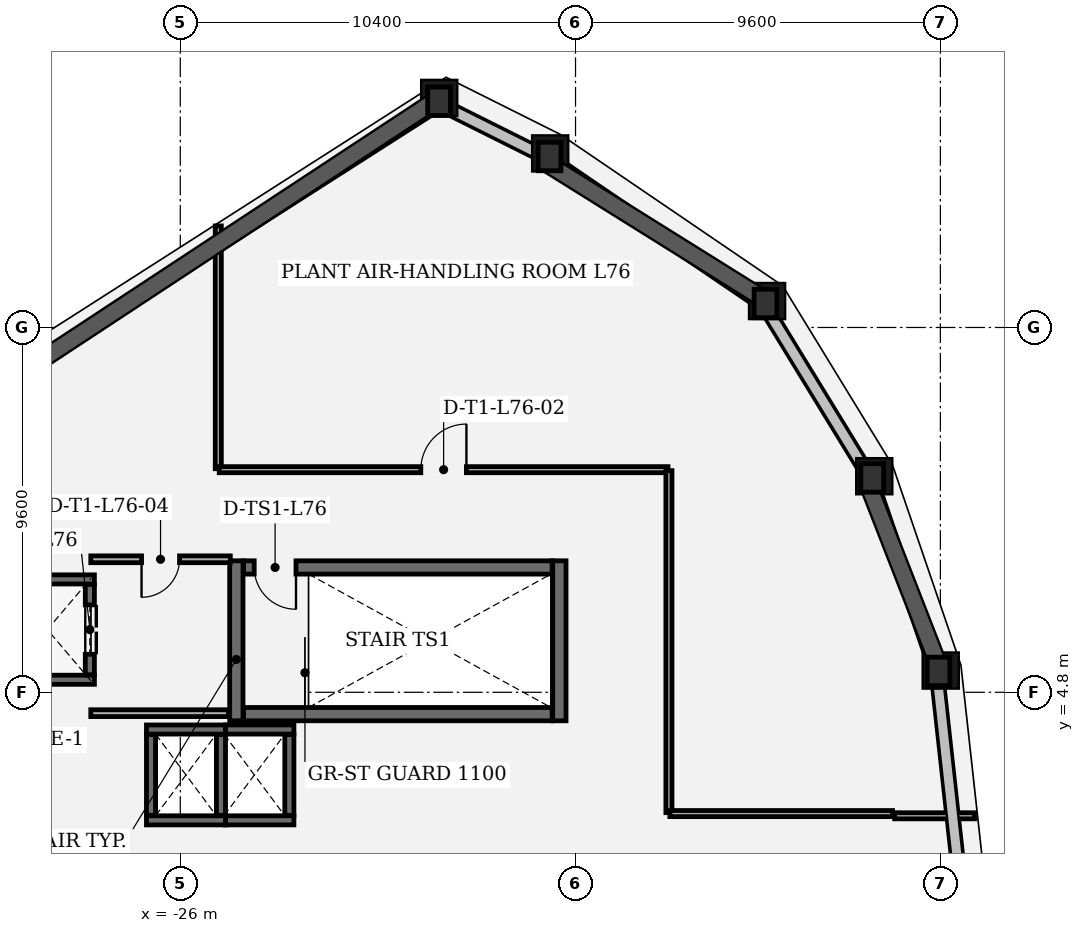
"""IFC4 building model, lengths in metres.
Left out: names, types, materials, properties, quantities, classifications, styles, units other than length and angle.
Written with IfcOpenShell. Run it as: python <this file> out.ifc"""

import sys

from ifc_helpers import new_model, si_unit, direction, frame, frame_2d, origin, place, context, subcontext, project, spatial, rectangle, extrude, element, fill, save


model = new_model("IFC4")
c1 = context("Model", 3, precision=1e-05, world=origin(), true_north=direction((0.0, 1.0)))
c2 = subcontext(c1, "Body", "Model", "MODEL_VIEW")
j1 = project(units=[si_unit("LENGTHUNIT", "METRE"), si_unit("PLANEANGLEUNIT", "RADIAN")], contexts=[c1])
p1 = place(None, origin())
s1 = spatial("IfcSite", under=j1, at=p1, CompositionType="ELEMENT")
p2 = place(p1, origin())
s2 = spatial("IfcBuilding", under=s1, at=p2, CompositionType="ELEMENT")
p3 = place(p2, frame((0.0, 0.0, 327.0)))
s3 = spatial("IfcBuildingStorey", under=s2, at=p3, CompositionType="ELEMENT", Elevation=327.0)
for number, where, z_axis, x_axis in (
    (1, (-24.525, 8.26, 0.0), (0.0, 0.0, 1.0), (0.0, -1.0, 0.0)),
    (2, (-16.025, 4.05, 0.0), (0.0, 0.0, 1.0), (0.0, 1.0, 0.0)),
):
    element("IfcWall", number, at=place(p3, frame(where, z_axis=z_axis, x_axis=x_axis)), inside=s3, PredefinedType="SHEAR", context=c2, shape_type="SweptSolid", body=[
        extrude(rectangle(XDim=4.21, YDim=0.35, at=frame_2d((2.105, 0.0))), origin(), (0.0, 0.0, 1.0), 3.92),
    ])
p4 = place(p3, frame((-24.335, 4.225, 0.0), z_axis=(0.0, 0.0, 1.0), x_axis=(1.0, 0.0, 0.0)))
e3 = element("IfcWall", 3, at=p4, inside=s3, PredefinedType="SHEAR", context=c2, shape_type="SweptSolid", body=[
    extrude(rectangle(XDim=8.12, YDim=0.35, at=frame_2d((4.06, 0.0))), origin(), (0.0, 0.0, 1.0), 3.92),
])
p5 = place(p3, frame((-16.215, 8.085, 0.0), z_axis=(0.0, 0.0, 1.0), x_axis=(-1.0, 0.0, 0.0)))
e4 = element("IfcWall", 4, at=p5, inside=s3, PredefinedType="SHEAR", context=c2, shape_type="SweptSolid", body=[
    extrude(rectangle(XDim=8.12, YDim=0.35, at=frame_2d((4.06, 0.0))), origin(), (0.0, 0.0, 1.0), 3.92),
])
p6 = place(p5, frame((6.74, 0.0, 0.0)))
e5 = element("IfcOpeningElement", 5, at=p6, cuts=e4, PredefinedType="OPENING", context=c2, shape_type="SweptSolid", body=[
    extrude(rectangle(XDim=1.1, YDim=2.2, at=frame_2d((0.55, 1.1))), frame((0.0, 0.185, 0.0), z_axis=(0.0, -1.0, 0.0), x_axis=(1.0, 0.0, 0.0)), (0.0, 0.0, 1.0), 0.37),
])
for number, where, z_axis, x_axis in (
    (6, (-28.26, 5.13, 0.0), (0.0, 0.0, 1.0), (-1.0, 0.0, 0.0)),
    (7, (-30.74, 7.77, 0.0), (0.0, 0.0, 1.0), (1.0, 0.0, 0.0)),
):
    element("IfcWall", number, at=place(p3, frame(where, z_axis=z_axis, x_axis=x_axis)), inside=s3, PredefinedType="SHEAR", context=c2, shape_type="SweptSolid", body=[
        extrude(rectangle(XDim=2.48, YDim=0.24, at=frame_2d((1.24, 0.0))), origin(), (0.0, 0.0, 1.0), 3.92),
    ])
p7 = place(p3, frame((-28.38, 7.638, 0.0), z_axis=(0.0, 0.0, 1.0), x_axis=(0.0, -1.0, 0.0)))
e8 = element("IfcWall", 8, at=p7, inside=s3, PredefinedType="SHEAR", context=c2, shape_type="SweptSolid", body=[
    extrude(rectangle(XDim=2.376, YDim=0.24, at=frame_2d((1.188, 0.0))), origin(), (0.0, 0.0, 1.0), 3.92),
])
p8 = place(p7, frame((0.538, 0.0, 0.0)))
e9 = element("IfcOpeningElement", 9, at=p8, cuts=e8, PredefinedType="OPENING", context=c2, shape_type="SweptSolid", body=[
    extrude(rectangle(XDim=1.3, YDim=2.3, at=frame_2d((0.65, 1.15))), frame((0.0, 0.13, 0.0), z_axis=(0.0, -1.0, 0.0), x_axis=(1.0, 0.0, 0.0)), (0.0, 0.0, 1.0), 0.26),
])
for number, where, z_axis, x_axis in (
    (10, (-24.81, 1.43, 0.0), (0.0, 0.0, 1.0), (-1.0, 0.0, 0.0)),
    (11, (-26.89, 3.82, 0.0), (0.0, 0.0, 1.0), (1.0, 0.0, 0.0)),
):
    element("IfcWall", number, at=place(p3, frame(where, z_axis=z_axis, x_axis=x_axis)), inside=s3, PredefinedType="SHEAR", context=c2, shape_type="SweptSolid", body=[
        extrude(rectangle(XDim=2.08, YDim=0.24, at=frame_2d((1.04, 0.0))), origin(), (0.0, 0.0, 1.0), 3.92),
    ])
for number, where, z_axis, x_axis in (
    (12, (-26.77, 1.562, 0.0), (0.0, 0.0, 1.0), (0.0, 1.0, 0.0)),
    (13, (-24.93, 3.688, 0.0), (0.0, 0.0, 1.0), (0.0, -1.0, 0.0)),
):
    element("IfcWall", number, at=place(p3, frame(where, z_axis=z_axis, x_axis=x_axis)), inside=s3, PredefinedType="SHEAR", context=c2, shape_type="SweptSolid", body=[
        extrude(rectangle(XDim=2.126, YDim=0.24, at=frame_2d((1.063, 0.0))), origin(), (0.0, 0.0, 1.0), 3.92),
    ])
for number, where, z_axis, x_axis in (
    (14, (-23.01, 1.43, 0.0), (0.0, 0.0, 1.0), (-1.0, 0.0, 0.0)),
    (15, (-24.81, 3.82, 0.0), (0.0, 0.0, 1.0), (1.0, 0.0, 0.0)),
):
    element("IfcWall", number, at=place(p3, frame(where, z_axis=z_axis, x_axis=x_axis)), inside=s3, PredefinedType="SHEAR", context=c2, shape_type="SweptSolid", body=[
        extrude(rectangle(XDim=1.8, YDim=0.24, at=frame_2d((0.9, 0.0))), origin(), (0.0, 0.0, 1.0), 3.92),
    ])
p9 = place(p3, frame((-23.13, 3.688, 0.0), z_axis=(0.0, 0.0, 1.0), x_axis=(0.0, -1.0, 0.0)))
e16 = element("IfcWall", 16, at=p9, inside=s3, PredefinedType="SHEAR", context=c2, shape_type="SweptSolid", body=[
    extrude(rectangle(XDim=2.126, YDim=0.24, at=frame_2d((1.063, 0.0))), origin(), (0.0, 0.0, 1.0), 3.92),
])
p10 = place(p3, frame((-28.355, 4.25, 0.0), z_axis=(0.0, 0.0, 1.0), x_axis=(1.0, 0.0, 0.0)))
e17 = element("IfcWall", 17, at=p10, inside=s3, PredefinedType="PARTITIONING", context=c2, shape_type="SweptSolid", body=[
    extrude(rectangle(XDim=3.622, YDim=0.18, at=frame_2d((1.811, 0.0))), origin(), (0.0, 0.0, 1.0), 3.92),
])
p11 = place(p3, frame((-24.684, 8.3, 0.0), z_axis=(0.0, 0.0, 1.0), x_axis=(-1.0, 0.0, 0.0)))
e18 = element("IfcWall", 18, at=p11, inside=s3, PredefinedType="PARTITIONING", context=c2, shape_type="SweptSolid", body=[
    extrude(rectangle(XDim=3.671, YDim=0.18, at=frame_2d((1.835, 0.0))), origin(), (0.0, 0.0, 1.0), 3.92),
])
p12 = place(p11, frame((1.335, 0.0, 0.0)))
e19 = element("IfcOpeningElement", 19, at=p12, cuts=e18, PredefinedType="OPENING", context=c2, shape_type="SweptSolid", body=[
    extrude(rectangle(XDim=1.0, YDim=2.15, at=frame_2d((0.5, 1.075))), frame((0.0, 0.1, 0.0), z_axis=(0.0, -1.0, 0.0), x_axis=(1.0, 0.0, 0.0)), (0.0, 0.0, 1.0), 0.2),
])
p13 = place(p3, frame((-25.0, 17.073, 0.0), z_axis=(0.0, 0.0, 1.0), x_axis=(0.0, -1.0, 0.0)))
e20 = element("IfcWall", 20, at=p13, inside=s3, PredefinedType="PARTITIONING", context=c2, shape_type="SweptSolid", body=[
    extrude(rectangle(XDim=6.389, YDim=0.16, at=frame_2d((3.195, 0.0))), origin(), (0.0, 0.0, 1.0), 3.92),
])
p14 = place(p3, frame((-24.975, 10.658, 0.0), z_axis=(0.0, 0.0, 1.0), x_axis=(1.0, 0.0, 0.0)))
e21 = element("IfcWall", 21, at=p14, inside=s3, PredefinedType="PARTITIONING", context=c2, shape_type="SweptSolid", body=[
    extrude(rectangle(XDim=11.808, YDim=0.16, at=frame_2d((5.904, 0.0))), origin(), (0.0, 0.0, 1.0), 3.92),
])
p15 = place(p14, frame((5.304, 0.0, 0.0)))
e22 = element("IfcOpeningElement", 22, at=p15, cuts=e21, PredefinedType="OPENING", context=c2, shape_type="SweptSolid", body=[
    extrude(rectangle(XDim=1.2, YDim=2.15, at=frame_2d((0.6, 1.075))), frame((0.0, 0.09, 0.0), z_axis=(0.0, -1.0, 0.0), x_axis=(1.0, 0.0, 0.0)), (0.0, 0.0, 1.0), 0.18),
])
p16 = place(p3, frame((-13.142, 1.633, 0.0), z_axis=(0.0, 0.0, 1.0), x_axis=(0.0, 1.0, 0.0)))
e23 = element("IfcWall", 23, at=p16, inside=s3, PredefinedType="PARTITIONING", context=c2, shape_type="SweptSolid", body=[
    extrude(rectangle(XDim=9.0, YDim=0.16, at=frame_2d((4.5, 0.0))), origin(), (0.0, 0.0, 1.0), 3.92),
])
p17 = place(p3, frame((-13.117, 1.608, 0.0), z_axis=(0.0, 0.0, 1.0), x_axis=(1.0, 0.0, 0.0)))
e24 = element("IfcWall", 24, at=p17, inside=s3, PredefinedType="PARTITIONING", context=c2, shape_type="SweptSolid", body=[
    extrude(rectangle(XDim=5.859, YDim=0.16, at=frame_2d((2.93, 0.0))), origin(), (0.0, 0.0, 1.0), 3.92),
])
p18 = place(p3, frame((-7.202, 1.55, 0.0), z_axis=(0.0, 0.0, 1.0), x_axis=(1.0, 0.0, 0.0)))
e25 = element("IfcWall", 25, at=p18, inside=s3, PredefinedType="PARTITIONING", context=c2, shape_type="SweptSolid", body=[
    extrude(rectangle(XDim=2.1, YDim=0.16, at=frame_2d((1.05, 0.0))), origin(), (0.0, 0.0, 1.0), 3.92),
])
p19 = place(p6, origin())
e26 = element("IfcDoor", 26, at=p19, inside=s3, OperationType="SINGLE_SWING_LEFT", PredefinedType="DOOR", context=c2, shape_type="SweptSolid", body=[
    extrude(rectangle(XDim=1.1, YDim=2.2, at=frame_2d((0.55, 1.1))), frame((0.0, 0.025, 0.0), z_axis=(0.0, -1.0, 0.0), x_axis=(1.0, 0.0, 0.0)), (0.0, 0.0, 1.0), 0.05),
])
fill(e5, e26)
p20 = place(p8, origin())
e27 = element("IfcDoor", 27, at=p20, inside=s3, OperationType="DOUBLE_DOOR_SLIDING", PredefinedType="DOOR", context=c2, shape_type="SweptSolid", body=[
    extrude(rectangle(XDim=1.3, YDim=2.3, at=frame_2d((0.65, 1.15))), frame((0.0, 0.025, 0.0), z_axis=(0.0, -1.0, 0.0), x_axis=(1.0, 0.0, 0.0)), (0.0, 0.0, 1.0), 0.05),
])
fill(e9, e27)
p21 = place(p15, origin())
e28 = element("IfcDoor", 28, at=p21, inside=s3, OperationType="SINGLE_SWING_RIGHT", PredefinedType="DOOR", context=c2, shape_type="SweptSolid", body=[
    extrude(rectangle(XDim=1.2, YDim=2.15, at=frame_2d((0.6, 1.075))), frame((0.0, 0.025, 0.0), z_axis=(0.0, -1.0, 0.0), x_axis=(1.0, 0.0, 0.0)), (0.0, 0.0, 1.0), 0.05),
])
fill(e22, e28)
p22 = place(p12, origin())
e29 = element("IfcDoor", 29, at=p22, inside=s3, OperationType="SINGLE_SWING_RIGHT", PredefinedType="DOOR", context=c2, shape_type="SweptSolid", body=[
    extrude(rectangle(XDim=1.0, YDim=2.15, at=frame_2d((0.5, 1.075))), frame((0.0, 0.025, 0.0), z_axis=(0.0, -1.0, 0.0), x_axis=(1.0, 0.0, 0.0)), (0.0, 0.0, 1.0), 0.05),
])
fill(e19, e29)
save(model, sys.argv[1])
